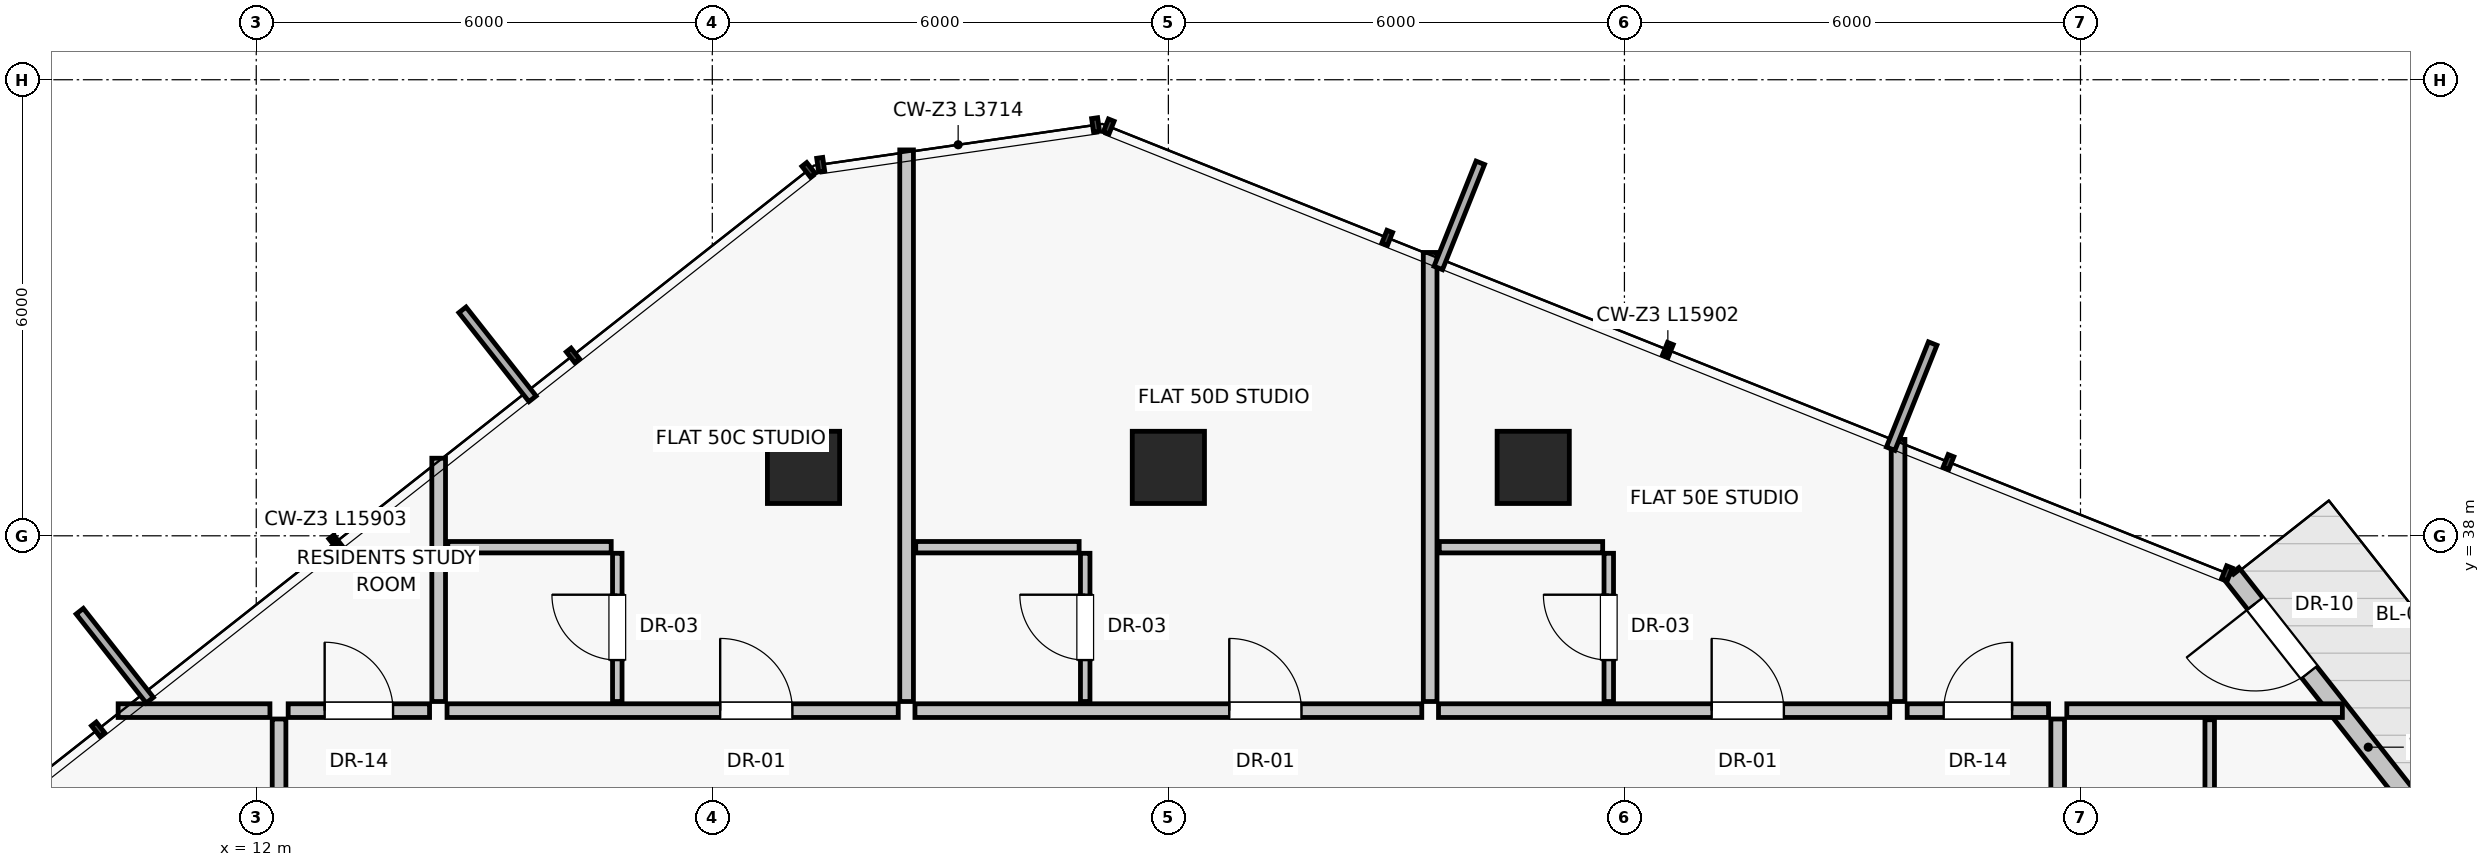
"""IFC4 building model, lengths in metres.
Left out: names, types, materials, properties, quantities, classifications, styles, units other than length and angle.
Written with IfcOpenShell. Run it as: python <this file> out.ifc"""

import sys

from ifc_helpers import new_model, si_unit, direction, frame, frame_2d, origin, origin_2d, place, context, subcontext, project, spatial, rectangle, extrude, source, transform, mapped, element, fill, save


model = new_model("IFC4")
c1 = context("Model", 3, precision=1e-05, world=origin(), true_north=direction((0.0, 1.0)))
c2 = subcontext(c1, "Body", "Model", "MODEL_VIEW")
j1 = project(units=[si_unit("LENGTHUNIT", "METRE"), si_unit("PLANEANGLEUNIT", "RADIAN")], contexts=[c1])
p1 = place(None, origin())
s1 = spatial("IfcSite", under=j1, at=p1, CompositionType="ELEMENT")
p2 = place(p1, origin())
s2 = spatial("IfcBuilding", under=s1, at=p2, CompositionType="ELEMENT")
p3 = place(p2, frame((0.0, 0.0, 178.85)))
s3 = spatial("IfcBuildingStorey", under=s2, at=p3, CompositionType="ELEMENT", Elevation=178.85)
for number, where, z_axis, x_axis in (
    (1, (28.8, 38.9, 0.0), (0.0, 0.0, 1.0), (1.0, 0.0, 0.0)),
    (2, (24.0, 38.9, 0.0), (0.0, 0.0, 1.0), (1.0, 0.0, 0.0)),
    (3, (19.2, 38.9, 0.0), (0.0, 0.0, 1.0), (1.0, 0.0, 0.0)),
):
    element("IfcColumn", number, at=place(p3, frame(where, z_axis=z_axis, x_axis=x_axis)), inside=s3, PredefinedType="COLUMN", context=c2, shape_type="SweptSolid", body=[
        extrude(rectangle(XDim=0.95, YDim=0.95, at=origin_2d()), origin(), (0.0, 0.0, 1.0), 3.25),
    ])
p4 = place(p3, frame((40.408, 34.43, 0.0), z_axis=(0.0, 0.0, 1.0), x_axis=(-0.618713620212, 0.78561660889, 0.0)))
e4 = element("IfcWall", 4, at=p4, inside=s3, PredefinedType="SOLIDWALL", context=c2, shape_type="SweptSolid", body=[
    extrude(rectangle(XDim=3.914, YDim=0.25, at=frame_2d((1.957, 0.0))), origin(), (0.0, 0.0, 1.0), 3.015),
])
p5 = place(p4, frame((2.26, 0.0, 0.0)))
e5 = element("IfcOpeningElement", 5, at=p5, cuts=e4, PredefinedType="OPENING", context=c2, shape_type="SweptSolid", body=[
    extrude(rectangle(XDim=1.15, YDim=2.25, at=frame_2d((0.575, 1.125))), frame((0.0, 0.135, 0.0), z_axis=(0.0, -1.0, 0.0), x_axis=(1.0, 0.0, 0.0)), (0.0, 0.0, 1.0), 0.27),
])
p6 = place(p3, frame((14.4, 35.82, 0.0), z_axis=(0.0, 0.0, 1.0), x_axis=(0.0, 1.0, 0.0)))
e6 = element("IfcWall", 6, at=p6, inside=s3, PredefinedType="PARTITIONING", context=c2, shape_type="SweptSolid", body=[
    extrude(rectangle(XDim=3.201, YDim=0.18, at=frame_2d((1.6, 0.0))), origin(), (0.0, 0.0, 1.0), 3.015),
])
p7 = place(p3, frame((33.6, 35.82, 0.0), z_axis=(0.0, 0.0, 1.0), x_axis=(0.0, 1.0, 0.0)))
e7 = element("IfcWall", 7, at=p7, inside=s3, PredefinedType="PARTITIONING", context=c2, shape_type="SweptSolid", body=[
    extrude(rectangle(XDim=3.448, YDim=0.18, at=frame_2d((1.724, 0.0))), origin(), (0.0, 0.0, 1.0), 3.015),
])
p8 = place(p3, frame((14.51, 35.7, 0.0), z_axis=(0.0, 0.0, 1.0), x_axis=(1.0, 0.0, 0.0)))
e8 = element("IfcWall", 8, at=p8, inside=s3, PredefinedType="PARTITIONING", context=c2, shape_type="SweptSolid", body=[
    extrude(rectangle(XDim=5.936, YDim=0.18, at=frame_2d((2.968, 0.0))), origin(), (0.0, 0.0, 1.0), 3.015),
])
p9 = place(p8, frame((3.594, 0.0, 0.0)))
e9 = element("IfcOpeningElement", 9, at=p9, cuts=e8, PredefinedType="OPENING", context=c2, shape_type="SweptSolid", body=[
    extrude(rectangle(XDim=0.95, YDim=2.02, at=frame_2d((0.475, 1.01))), frame((0.0, 0.1, 0.0), z_axis=(0.0, -1.0, 0.0), x_axis=(1.0, 0.0, 0.0)), (0.0, 0.0, 1.0), 0.2),
])
p10 = place(p3, frame((16.75, 35.82, 0.0), z_axis=(0.0, 0.0, 1.0), x_axis=(0.0, 1.0, 0.0)))
e10 = element("IfcWall", 10, at=p10, inside=s3, PredefinedType="PARTITIONING", context=c2, shape_type="SweptSolid", body=[
    extrude(rectangle(XDim=1.95, YDim=0.125, at=frame_2d((0.975, 0.0))), origin(), (0.0, 0.0, 1.0), 3.015),
])
p11 = place(p10, frame((0.545, 0.0, 0.0)))
e11 = element("IfcOpeningElement", 11, at=p11, cuts=e10, PredefinedType="OPENING", context=c2, shape_type="SweptSolid", body=[
    extrude(rectangle(XDim=0.86, YDim=2.01, at=frame_2d((0.43, 1.005))), frame((0.0, 0.073, 0.0), z_axis=(0.0, -1.0, 0.0), x_axis=(1.0, 0.0, 0.0)), (0.0, 0.0, 1.0), 0.145),
])
p12 = place(p3, frame((14.52, 37.85, 0.0), z_axis=(0.0, 0.0, 1.0), x_axis=(1.0, 0.0, 0.0)))
e12 = element("IfcWall", 12, at=p12, inside=s3, PredefinedType="PARTITIONING", context=c2, shape_type="SweptSolid", body=[
    extrude(rectangle(XDim=2.15, YDim=0.15, at=frame_2d((1.075, 0.0))), origin(), (0.0, 0.0, 1.0), 3.015),
])
p13 = place(p3, frame((20.556, 35.82, 0.0), z_axis=(0.0, 0.0, 1.0), x_axis=(0.0, 1.0, 0.0)))
e13 = element("IfcWall", 13, at=p13, inside=s3, PredefinedType="PARTITIONING", context=c2, shape_type="SweptSolid", body=[
    extrude(rectangle(XDim=7.257, YDim=0.18, at=frame_2d((3.628, 0.0))), origin(), (0.0, 0.0, 1.0), 3.015),
])
p14 = place(p3, frame((20.666, 35.7, 0.0), z_axis=(0.0, 0.0, 1.0), x_axis=(1.0, 0.0, 0.0)))
e14 = element("IfcWall", 14, at=p14, inside=s3, PredefinedType="PARTITIONING", context=c2, shape_type="SweptSolid", body=[
    extrude(rectangle(XDim=6.668, YDim=0.18, at=frame_2d((3.334, 0.0))), origin(), (0.0, 0.0, 1.0), 3.015),
])
p15 = place(p14, frame((4.135, 0.0, 0.0)))
e15 = element("IfcOpeningElement", 15, at=p15, cuts=e14, PredefinedType="OPENING", context=c2, shape_type="SweptSolid", body=[
    extrude(rectangle(XDim=0.95, YDim=2.02, at=frame_2d((0.475, 1.01))), frame((0.0, 0.1, 0.0), z_axis=(0.0, -1.0, 0.0), x_axis=(1.0, 0.0, 0.0)), (0.0, 0.0, 1.0), 0.2),
])
p16 = place(p3, frame((22.906, 35.82, 0.0), z_axis=(0.0, 0.0, 1.0), x_axis=(0.0, 1.0, 0.0)))
e16 = element("IfcWall", 16, at=p16, inside=s3, PredefinedType="PARTITIONING", context=c2, shape_type="SweptSolid", body=[
    extrude(rectangle(XDim=1.95, YDim=0.125, at=frame_2d((0.975, 0.0))), origin(), (0.0, 0.0, 1.0), 3.015),
])
p17 = place(p16, frame((0.545, 0.0, 0.0)))
e17 = element("IfcOpeningElement", 17, at=p17, cuts=e16, PredefinedType="OPENING", context=c2, shape_type="SweptSolid", body=[
    extrude(rectangle(XDim=0.86, YDim=2.01, at=frame_2d((0.43, 1.005))), frame((0.0, 0.073, 0.0), z_axis=(0.0, -1.0, 0.0), x_axis=(1.0, 0.0, 0.0)), (0.0, 0.0, 1.0), 0.145),
])
p18 = place(p3, frame((20.676, 37.85, 0.0), z_axis=(0.0, 0.0, 1.0), x_axis=(1.0, 0.0, 0.0)))
e18 = element("IfcWall", 18, at=p18, inside=s3, PredefinedType="PARTITIONING", context=c2, shape_type="SweptSolid", body=[
    extrude(rectangle(XDim=2.15, YDim=0.15, at=frame_2d((1.075, 0.0))), origin(), (0.0, 0.0, 1.0), 3.015),
])
p19 = place(p3, frame((27.444, 35.82, 0.0), z_axis=(0.0, 0.0, 1.0), x_axis=(0.0, 1.0, 0.0)))
e19 = element("IfcWall", 19, at=p19, inside=s3, PredefinedType="PARTITIONING", context=c2, shape_type="SweptSolid", body=[
    extrude(rectangle(XDim=5.908, YDim=0.18, at=frame_2d((2.954, 0.0))), origin(), (0.0, 0.0, 1.0), 3.015),
])
p20 = place(p3, frame((27.554, 35.7, 0.0), z_axis=(0.0, 0.0, 1.0), x_axis=(1.0, 0.0, 0.0)))
e20 = element("IfcWall", 20, at=p20, inside=s3, PredefinedType="PARTITIONING", context=c2, shape_type="SweptSolid", body=[
    extrude(rectangle(XDim=5.936, YDim=0.18, at=frame_2d((2.968, 0.0))), origin(), (0.0, 0.0, 1.0), 3.015),
])
p21 = place(p20, frame((3.594, 0.0, 0.0)))
e21 = element("IfcOpeningElement", 21, at=p21, cuts=e20, PredefinedType="OPENING", context=c2, shape_type="SweptSolid", body=[
    extrude(rectangle(XDim=0.95, YDim=2.02, at=frame_2d((0.475, 1.01))), frame((0.0, 0.1, 0.0), z_axis=(0.0, -1.0, 0.0), x_axis=(1.0, 0.0, 0.0)), (0.0, 0.0, 1.0), 0.2),
])
p22 = place(p3, frame((29.794, 35.82, 0.0), z_axis=(0.0, 0.0, 1.0), x_axis=(0.0, 1.0, 0.0)))
e22 = element("IfcWall", 22, at=p22, inside=s3, PredefinedType="PARTITIONING", context=c2, shape_type="SweptSolid", body=[
    extrude(rectangle(XDim=1.95, YDim=0.125, at=frame_2d((0.975, 0.0))), origin(), (0.0, 0.0, 1.0), 2.469),
])
p23 = place(p22, frame((0.545, 0.0, 0.0)))
e23 = element("IfcOpeningElement", 23, at=p23, cuts=e22, PredefinedType="OPENING", context=c2, shape_type="SweptSolid", body=[
    extrude(rectangle(XDim=0.86, YDim=2.01, at=frame_2d((0.43, 1.005))), frame((0.0, 0.073, 0.0), z_axis=(0.0, -1.0, 0.0), x_axis=(1.0, 0.0, 0.0)), (0.0, 0.0, 1.0), 0.145),
])
p24 = place(p3, frame((27.564, 37.85, 0.0), z_axis=(0.0, 0.0, 1.0), x_axis=(1.0, 0.0, 0.0)))
e24 = element("IfcWall", 24, at=p24, inside=s3, PredefinedType="PARTITIONING", context=c2, shape_type="SweptSolid", body=[
    extrude(rectangle(XDim=2.15, YDim=0.15, at=frame_2d((1.075, 0.0))), origin(), (0.0, 0.0, 1.0), 3.015),
])
p25 = place(p3, frame((12.18, 35.7, 0.0), z_axis=(0.0, 0.0, 1.0), x_axis=(-1.0, 0.0, 0.0)))
e25 = element("IfcWall", 25, at=p25, inside=s3, PredefinedType="PARTITIONING", context=c2, shape_type="SweptSolid", body=[
    extrude(rectangle(XDim=1.997, YDim=0.18, at=frame_2d((0.999, 0.0))), origin(), (0.0, 0.0, 1.0), 3.015),
])
p26 = place(p3, frame((12.3, 29.146, 0.0), z_axis=(0.0, 0.0, 1.0), x_axis=(0.0, 1.0, 0.0)))
e26 = element("IfcWall", 26, at=p26, inside=s3, PredefinedType="PARTITIONING", context=c2, shape_type="SweptSolid", body=[
    extrude(rectangle(XDim=6.444, YDim=0.18, at=frame_2d((3.222, 0.0))), origin(), (0.0, 0.0, 1.0), 3.015),
])
p27 = place(p26, frame((2.722, 0.0, 0.0)))
e27 = element("IfcOpeningElement", 27, at=p27, cuts=e26, PredefinedType="OPENING", context=c2, shape_type="SweptSolid", body=[
    extrude(rectangle(XDim=1.0, YDim=2.01, at=frame_2d((0.5, 1.005))), frame((0.0, 0.1, 0.0), z_axis=(0.0, -1.0, 0.0), x_axis=(1.0, 0.0, 0.0)), (0.0, 0.0, 1.0), 0.2),
])
p28 = place(p3, frame((35.82, 35.7, 0.0), z_axis=(0.0, 0.0, 1.0), x_axis=(1.0, 0.0, 0.0)))
e28 = element("IfcWall", 28, at=p28, inside=s3, PredefinedType="PARTITIONING", context=c2, shape_type="SweptSolid", body=[
    extrude(rectangle(XDim=3.625, YDim=0.18, at=frame_2d((1.812, 0.0))), origin(), (0.0, 0.0, 1.0), 3.015),
])
p29 = place(p3, frame((35.7, 19.31, 0.0), z_axis=(0.0, 0.0, 1.0), x_axis=(0.0, 1.0, 0.0)))
e29 = element("IfcWall", 29, at=p29, inside=s3, PredefinedType="PARTITIONING", context=c2, shape_type="SweptSolid", body=[
    extrude(rectangle(XDim=16.28, YDim=0.18, at=frame_2d((8.14, 0.0))), origin(), (0.0, 0.0, 1.0), 3.015),
])
p30 = place(p29, frame((5.34, 0.0, 0.0)))
e30 = element("IfcOpeningElement", 30, at=p30, cuts=e29, PredefinedType="OPENING", context=c2, shape_type="SweptSolid", body=[
    extrude(rectangle(XDim=0.95, YDim=2.02, at=frame_2d((0.475, 1.01))), frame((0.0, 0.1, 0.0), z_axis=(0.0, -1.0, 0.0), x_axis=(1.0, 0.0, 0.0)), (0.0, 0.0, 1.0), 0.2),
])
p31 = place(p3, frame((37.7, 28.9, 0.0), z_axis=(0.0, 0.0, 1.0), x_axis=(0.0, 1.0, 0.0)))
e31 = element("IfcWall", 31, at=p31, inside=s3, PredefinedType="PARTITIONING", context=c2, shape_type="SweptSolid", body=[
    extrude(rectangle(XDim=6.68, YDim=0.125, at=frame_2d((3.34, 0.0))), origin(), (0.0, 0.0, 1.0), 3.015),
])
p32 = place(p3, frame((12.42, 35.7, 0.0), z_axis=(0.0, 0.0, 1.0), x_axis=(1.0, 0.0, 0.0)))
e32 = element("IfcWall", 32, at=p32, inside=s3, PredefinedType="PARTITIONING", context=c2, shape_type="SweptSolid", body=[
    extrude(rectangle(XDim=1.86, YDim=0.18, at=frame_2d((0.93, 0.0))), origin(), (0.0, 0.0, 1.0), 3.015),
])
p33 = place(p32, frame((0.48, 0.0, 0.0)))
e33 = element("IfcOpeningElement", 33, at=p33, cuts=e32, PredefinedType="OPENING", context=c2, shape_type="SweptSolid", body=[
    extrude(rectangle(XDim=0.9, YDim=2.01, at=frame_2d((0.45, 1.005))), frame((0.0, 0.1, 0.0), z_axis=(0.0, -1.0, 0.0), x_axis=(1.0, 0.0, 0.0)), (0.0, 0.0, 1.0), 0.2),
])
p34 = place(p3, frame((33.72, 35.7, 0.0), z_axis=(0.0, 0.0, 1.0), x_axis=(1.0, 0.0, 0.0)))
e34 = element("IfcWall", 34, at=p34, inside=s3, PredefinedType="PARTITIONING", context=c2, shape_type="SweptSolid", body=[
    extrude(rectangle(XDim=1.86, YDim=0.18, at=frame_2d((0.93, 0.0))), origin(), (0.0, 0.0, 1.0), 3.015),
])
p35 = place(p34, frame((0.48, 0.0, 0.0)))
e35 = element("IfcOpeningElement", 35, at=p35, cuts=e34, PredefinedType="OPENING", context=c2, shape_type="SweptSolid", body=[
    extrude(rectangle(XDim=0.9, YDim=2.01, at=frame_2d((0.45, 1.005))), frame((0.0, 0.1, 0.0), z_axis=(0.0, -1.0, 0.0), x_axis=(1.0, 0.0, 0.0)), (0.0, 0.0, 1.0), 0.2),
])
m1 = source(origin(), c2, "Body", "SweptSolid", [
    extrude(rectangle(XDim=1.15, YDim=2.25, at=frame_2d((0.575, 1.125))), frame((0.0, 0.025, 0.0), z_axis=(0.0, -1.0, 0.0), x_axis=(1.0, 0.0, 0.0)), (0.0, 0.0, 1.0), 0.05),
])
p36 = place(p5, frame((1.15, 0.0, 0.0), z_axis=(0.0, 0.0, 1.0), x_axis=(-1.0, 0.0, 0.0)))
e36 = element("IfcDoor", 36, at=p36, inside=s3, OperationType="SINGLE_SWING_RIGHT", PredefinedType="DOOR", context=c2, shape_type="MappedRepresentation", body=[
    mapped(m1, transform((0.0, 0.0, 0.0), scale=1.0)),
])
fill(e5, e36)
m2 = source(origin(), c2, "Body", "SweptSolid", [
    extrude(rectangle(XDim=0.95, YDim=2.02, at=frame_2d((0.475, 1.01))), frame((0.0, 0.025, 0.0), z_axis=(0.0, -1.0, 0.0), x_axis=(1.0, 0.0, 0.0)), (0.0, 0.0, 1.0), 0.05),
])
p37 = place(p9, origin())
e37 = element("IfcDoor", 37, at=p37, inside=s3, OperationType="SINGLE_SWING_LEFT", PredefinedType="DOOR", context=c2, shape_type="MappedRepresentation", body=[
    mapped(m2, transform((0.0, 0.0, 0.0), scale=1.0)),
])
fill(e9, e37)
m3 = source(origin(), c2, "Body", "SweptSolid", [
    extrude(rectangle(XDim=0.86, YDim=2.01, at=frame_2d((0.43, 1.005))), frame((0.0, 0.025, 0.0), z_axis=(0.0, -1.0, 0.0), x_axis=(1.0, 0.0, 0.0)), (0.0, 0.0, 1.0), 0.05),
])
p38 = place(p11, origin())
e38 = element("IfcDoor", 38, at=p38, inside=s3, OperationType="SINGLE_SWING_RIGHT", PredefinedType="DOOR", context=c2, shape_type="MappedRepresentation", body=[
    mapped(m3, transform((0.0, 0.0, 0.0), scale=1.0)),
])
fill(e11, e38)
p39 = place(p15, origin())
e39 = element("IfcDoor", 39, at=p39, inside=s3, OperationType="SINGLE_SWING_LEFT", PredefinedType="DOOR", context=c2, shape_type="MappedRepresentation", body=[
    mapped(m2, transform((0.0, 0.0, 0.0), scale=1.0)),
])
fill(e15, e39)
p40 = place(p17, origin())
e40 = element("IfcDoor", 40, at=p40, inside=s3, OperationType="SINGLE_SWING_RIGHT", PredefinedType="DOOR", context=c2, shape_type="MappedRepresentation", body=[
    mapped(m3, transform((0.0, 0.0, 0.0), scale=1.0)),
])
fill(e17, e40)
p41 = place(p21, origin())
e41 = element("IfcDoor", 41, at=p41, inside=s3, OperationType="SINGLE_SWING_LEFT", PredefinedType="DOOR", context=c2, shape_type="MappedRepresentation", body=[
    mapped(m2, transform((0.0, 0.0, 0.0), scale=1.0)),
])
fill(e21, e41)
p42 = place(p23, origin())
e42 = element("IfcDoor", 42, at=p42, inside=s3, OperationType="SINGLE_SWING_RIGHT", PredefinedType="DOOR", context=c2, shape_type="MappedRepresentation", body=[
    mapped(m3, transform((0.0, 0.0, 0.0), scale=1.0)),
])
fill(e23, e42)
m4 = source(origin(), c2, "Body", "SweptSolid", [
    extrude(rectangle(XDim=0.9, YDim=2.01, at=frame_2d((0.45, 1.005))), frame((0.0, 0.025, 0.0), z_axis=(0.0, -1.0, 0.0), x_axis=(1.0, 0.0, 0.0)), (0.0, 0.0, 1.0), 0.05),
])
p43 = place(p33, origin())
e43 = element("IfcDoor", 43, at=p43, inside=s3, OperationType="SINGLE_SWING_LEFT", PredefinedType="DOOR", context=c2, shape_type="MappedRepresentation", body=[
    mapped(m4, transform((0.0, 0.0, 0.0), scale=1.0)),
])
fill(e33, e43)
p44 = place(p35, origin())
e44 = element("IfcDoor", 44, at=p44, inside=s3, OperationType="SINGLE_SWING_RIGHT", PredefinedType="DOOR", context=c2, shape_type="MappedRepresentation", body=[
    mapped(m4, transform((0.0, 0.0, 0.0), scale=1.0)),
])
fill(e35, e44)
save(model, sys.argv[1])
